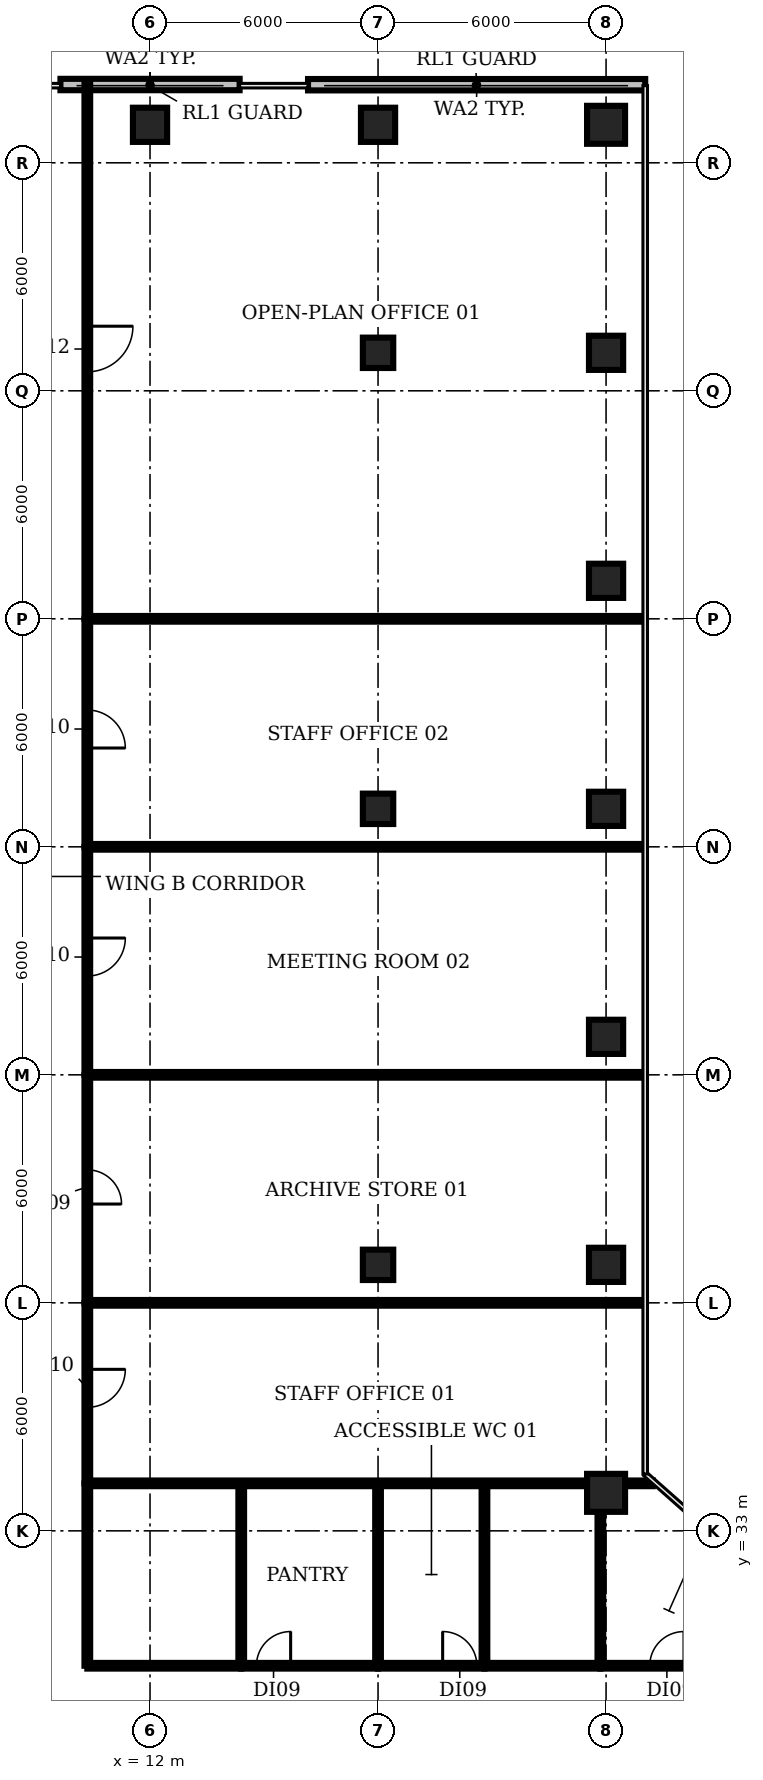
"""IFC4 building model, lengths in metres.
Left out: names, types, materials, properties, quantities, classifications, styles, units other than length and angle.
Written with IfcOpenShell. Run it as: python <this file> out.ifc"""

import sys

from ifc_helpers import new_model, si_unit, direction, frame, frame_2d, origin, origin_2d, place, context, subcontext, project, spatial, rectangle, circle, extrude, element, fill, save


model = new_model("IFC4")
c1 = context("Model", 3, precision=1e-05, world=origin(), true_north=direction((0.0, 1.0)))
c2 = subcontext(c1, "Body", "Model", "MODEL_VIEW")
j1 = project(units=[si_unit("LENGTHUNIT", "METRE"), si_unit("PLANEANGLEUNIT", "RADIAN")], contexts=[c1])
p1 = place(None, origin())
s1 = spatial("IfcSite", under=j1, at=p1, CompositionType="ELEMENT")
p2 = place(p1, origin())
s2 = spatial("IfcBuilding", under=s1, at=p2, CompositionType="ELEMENT")
p3 = place(p2, frame((0.0, 0.0, 96.2)))
s3 = spatial("IfcBuildingStorey", under=s2, at=p3, CompositionType="ELEMENT", Elevation=96.2)
p4 = place(p3, frame((12.0, 70.0, 0.0), z_axis=(0.0, 0.0, 1.0), x_axis=(1.0, 0.0, 0.0)))
e1 = element("IfcColumn", 1, at=p4, inside=s3, PredefinedType="COLUMN", context=c2, shape_type="SweptSolid", body=[
    extrude(rectangle(XDim=0.9, YDim=0.9, at=origin_2d()), origin(), (0.0, 0.0, 1.0), 3.85),
])
for number, where, z_axis, x_axis in (
    (2, (18.0, 40.0, 0.0), (0.0, 0.0, 1.0), (1.0, 0.0, 0.0)),
    (3, (18.0, 52.0, 0.0), (0.0, 0.0, 1.0), (1.0, 0.0, 0.0)),
    (4, (18.0, 64.0, 0.0), (0.0, 0.0, 1.0), (1.0, 0.0, 0.0)),
):
    element("IfcColumn", number, at=place(p3, frame(where, z_axis=z_axis, x_axis=x_axis)), inside=s3, PredefinedType="COLUMN", context=c2, shape_type="SweptSolid", body=[
        extrude(rectangle(XDim=0.8, YDim=0.8, at=origin_2d()), origin(), (0.0, 0.0, 1.0), 3.85),
    ])
p5 = place(p3, frame((18.0, 70.0, 0.0), z_axis=(0.0, 0.0, 1.0), x_axis=(1.0, 0.0, 0.0)))
e5 = element("IfcColumn", 5, at=p5, inside=s3, PredefinedType="COLUMN", context=c2, shape_type="SweptSolid", body=[
    extrude(rectangle(XDim=0.9, YDim=0.9, at=origin_2d()), origin(), (0.0, 0.0, 1.0), 3.85),
])
p6 = place(p3, frame((24.0, 34.0, 0.0), z_axis=(0.0, 0.0, 1.0), x_axis=(1.0, 0.0, 0.0)))
e6 = element("IfcColumn", 6, at=p6, inside=s3, PredefinedType="COLUMN", context=c2, shape_type="SweptSolid", body=[
    extrude(circle(Radius=0.5, at=origin_2d()), origin(), (0.0, 0.0, 1.0), 3.85),
])
for number, where, z_axis, x_axis in (
    (7, (24.0, 40.0, 0.0), (0.0, 0.0, 1.0), (1.0, 0.0, 0.0)),
    (8, (24.0, 46.0, 0.0), (0.0, 0.0, 1.0), (1.0, 0.0, 0.0)),
    (9, (24.0, 52.0, 0.0), (0.0, 0.0, 1.0), (1.0, 0.0, 0.0)),
    (10, (24.0, 58.0, 0.0), (0.0, 0.0, 1.0), (1.0, 0.0, 0.0)),
    (11, (24.0, 64.0, 0.0), (0.0, 0.0, 1.0), (1.0, 0.0, 0.0)),
):
    element("IfcColumn", number, at=place(p3, frame(where, z_axis=z_axis, x_axis=x_axis)), inside=s3, PredefinedType="COLUMN", context=c2, shape_type="SweptSolid", body=[
        extrude(rectangle(XDim=0.9, YDim=0.9, at=origin_2d()), origin(), (0.0, 0.0, 1.0), 3.85),
    ])
p7 = place(p3, frame((24.0, 70.0, 0.0), z_axis=(0.0, 0.0, 1.0), x_axis=(1.0, 0.0, 0.0)))
e12 = element("IfcColumn", 12, at=p7, inside=s3, PredefinedType="COLUMN", context=c2, shape_type="SweptSolid", body=[
    extrude(circle(Radius=0.5, at=origin_2d()), origin(), (0.0, 0.0, 1.0), 3.85),
])
p8 = place(p3, frame((25.03, 71.055, 0.0), z_axis=(0.0, 0.0, 1.0), x_axis=(-1.0, 0.0, 0.0)))
e13 = element("IfcWall", 13, at=p8, inside=s3, PredefinedType="SOLIDWALL", context=c2, shape_type="SweptSolid", body=[
    extrude(rectangle(XDim=8.873, YDim=0.3, at=frame_2d((4.436, 0.0))), origin(), (0.0, 0.0, 1.0), 3.85),
])
p9 = place(p3, frame((14.357, 71.06, 0.0), z_axis=(0.0, 0.0, 1.0), x_axis=(-1.0, 0.0, 0.0)))
e14 = element("IfcWall", 14, at=p9, inside=s3, PredefinedType="SOLIDWALL", context=c2, shape_type="SweptSolid", body=[
    extrude(rectangle(XDim=4.715, YDim=0.3, at=frame_2d((2.357, 0.0))), origin(), (0.0, 0.0, 1.0), 3.85),
])
p10 = place(p3, frame((10.35, 29.45, 0.0), z_axis=(0.0, 0.0, 1.0), x_axis=(0.0, 1.0, 0.0)))
e15 = element("IfcWall", 15, at=p10, inside=s3, PredefinedType="PARTITIONING", context=c2, shape_type="SweptSolid", body=[
    extrude(rectangle(XDim=4.8, YDim=0.15, at=frame_2d((2.4, 0.0))), origin(), (0.0, 0.0, 1.0), 2.83),
])
p11 = place(p3, frame((10.35, 29.45, 0.0), z_axis=(0.0, 0.0, 1.0), x_axis=(1.0, 0.0, 0.0)))
e16 = element("IfcWall", 16, at=p11, inside=s3, PredefinedType="PARTITIONING", context=c2, shape_type="SweptSolid", body=[
    extrude(rectangle(XDim=4.05, YDim=0.15, at=frame_2d((2.025, 0.0))), origin(), (0.0, 0.0, 1.0), 2.83),
])
p12 = place(p3, frame((10.35, 34.25, 0.0), z_axis=(0.0, 0.0, 1.0), x_axis=(1.0, 0.0, 0.0)))
e17 = element("IfcWall", 17, at=p12, inside=s3, PredefinedType="PARTITIONING", context=c2, shape_type="SweptSolid", body=[
    extrude(rectangle(XDim=14.88, YDim=0.15, at=frame_2d((7.44, 0.0))), origin(), (0.0, 0.0, 1.0), 2.83),
])
p13 = place(p3, frame((10.35, 39.0, 0.0), z_axis=(0.0, 0.0, 1.0), x_axis=(0.0, -1.0, 0.0)))
e18 = element("IfcWall", 18, at=p13, inside=s3, PredefinedType="PARTITIONING", context=c2, shape_type="SweptSolid", body=[
    extrude(rectangle(XDim=4.75, YDim=0.15, at=frame_2d((2.375, 0.0))), origin(), (0.0, 0.0, 1.0), 2.83),
])
p14 = place(p13, frame((1.75, 0.0, 0.0)))
e19 = element("IfcOpeningElement", 19, at=p14, cuts=e18, PredefinedType="OPENING", context=c2, shape_type="SweptSolid", body=[
    extrude(rectangle(XDim=1.0, YDim=2.1, at=frame_2d((0.5, 1.05))), frame((0.0, 0.085, 0.0), z_axis=(0.0, -1.0, 0.0), x_axis=(1.0, 0.0, 0.0)), (0.0, 0.0, 1.0), 0.17),
])
p15 = place(p3, frame((10.35, 39.0, 0.0), z_axis=(0.0, 0.0, 1.0), x_axis=(1.0, 0.0, 0.0)))
e20 = element("IfcWall", 20, at=p15, inside=s3, PredefinedType="PARTITIONING", context=c2, shape_type="SweptSolid", body=[
    extrude(rectangle(XDim=14.63, YDim=0.15, at=frame_2d((7.315, 0.0))), origin(), (0.0, 0.0, 1.0), 2.83),
])
p16 = place(p3, frame((10.35, 45.0, 0.0), z_axis=(0.0, 0.0, 1.0), x_axis=(0.0, -1.0, 0.0)))
e21 = element("IfcWall", 21, at=p16, inside=s3, PredefinedType="PARTITIONING", context=c2, shape_type="SweptSolid", body=[
    extrude(rectangle(XDim=6.0, YDim=0.15, at=frame_2d((3.0, 0.0))), origin(), (0.0, 0.0, 1.0), 2.83),
])
p17 = place(p16, frame((2.5, 0.0, 0.0)))
e22 = element("IfcOpeningElement", 22, at=p17, cuts=e21, PredefinedType="OPENING", context=c2, shape_type="SweptSolid", body=[
    extrude(rectangle(XDim=0.9, YDim=2.1, at=frame_2d((0.45, 1.05))), frame((0.0, 0.085, 0.0), z_axis=(0.0, -1.0, 0.0), x_axis=(1.0, 0.0, 0.0)), (0.0, 0.0, 1.0), 0.17),
])
p18 = place(p3, frame((10.35, 45.0, 0.0), z_axis=(0.0, 0.0, 1.0), x_axis=(1.0, 0.0, 0.0)))
e23 = element("IfcWall", 23, at=p18, inside=s3, PredefinedType="PARTITIONING", context=c2, shape_type="SweptSolid", body=[
    extrude(rectangle(XDim=14.63, YDim=0.15, at=frame_2d((7.315, 0.0))), origin(), (0.0, 0.0, 1.0), 2.83),
])
p19 = place(p3, frame((10.35, 51.0, 0.0), z_axis=(0.0, 0.0, 1.0), x_axis=(0.0, -1.0, 0.0)))
e24 = element("IfcWall", 24, at=p19, inside=s3, PredefinedType="PARTITIONING", context=c2, shape_type="SweptSolid", body=[
    extrude(rectangle(XDim=6.0, YDim=0.15, at=frame_2d((3.0, 0.0))), origin(), (0.0, 0.0, 1.0), 2.83),
])
p20 = place(p19, frame((2.4, 0.0, 0.0)))
e25 = element("IfcOpeningElement", 25, at=p20, cuts=e24, PredefinedType="OPENING", context=c2, shape_type="SweptSolid", body=[
    extrude(rectangle(XDim=1.0, YDim=2.1, at=frame_2d((0.5, 1.05))), frame((0.0, 0.085, 0.0), z_axis=(0.0, -1.0, 0.0), x_axis=(1.0, 0.0, 0.0)), (0.0, 0.0, 1.0), 0.17),
])
p21 = place(p3, frame((10.35, 51.0, 0.0), z_axis=(0.0, 0.0, 1.0), x_axis=(1.0, 0.0, 0.0)))
e26 = element("IfcWall", 26, at=p21, inside=s3, PredefinedType="PARTITIONING", context=c2, shape_type="SweptSolid", body=[
    extrude(rectangle(XDim=14.63, YDim=0.15, at=frame_2d((7.315, 0.0))), origin(), (0.0, 0.0, 1.0), 2.83),
])
p22 = place(p3, frame((10.35, 57.0, 0.0), z_axis=(0.0, 0.0, 1.0), x_axis=(0.0, -1.0, 0.0)))
e27 = element("IfcWall", 27, at=p22, inside=s3, PredefinedType="PARTITIONING", context=c2, shape_type="SweptSolid", body=[
    extrude(rectangle(XDim=6.0, YDim=0.15, at=frame_2d((3.0, 0.0))), origin(), (0.0, 0.0, 1.0), 2.83),
])
p23 = place(p22, frame((2.4, 0.0, 0.0)))
e28 = element("IfcOpeningElement", 28, at=p23, cuts=e27, PredefinedType="OPENING", context=c2, shape_type="SweptSolid", body=[
    extrude(rectangle(XDim=1.0, YDim=2.1, at=frame_2d((0.5, 1.05))), frame((0.0, 0.085, 0.0), z_axis=(0.0, -1.0, 0.0), x_axis=(1.0, 0.0, 0.0)), (0.0, 0.0, 1.0), 0.17),
])
p24 = place(p3, frame((10.35, 57.0, 0.0), z_axis=(0.0, 0.0, 1.0), x_axis=(1.0, 0.0, 0.0)))
e29 = element("IfcWall", 29, at=p24, inside=s3, PredefinedType="PARTITIONING", context=c2, shape_type="SweptSolid", body=[
    extrude(rectangle(XDim=14.63, YDim=0.15, at=frame_2d((7.315, 0.0))), origin(), (0.0, 0.0, 1.0), 2.83),
])
p25 = place(p3, frame((10.35, 71.09, 0.0), z_axis=(0.0, 0.0, 1.0), x_axis=(0.0, -1.0, 0.0)))
e30 = element("IfcWall", 30, at=p25, inside=s3, PredefinedType="PARTITIONING", context=c2, shape_type="SweptSolid", body=[
    extrude(rectangle(XDim=14.09, YDim=0.15, at=frame_2d((7.045, 0.0))), origin(), (0.0, 0.0, 1.0), 2.83),
])
p26 = place(p25, frame((6.39, 0.0, 0.0)))
e31 = element("IfcOpeningElement", 31, at=p26, cuts=e30, PredefinedType="OPENING", context=c2, shape_type="SweptSolid", body=[
    extrude(rectangle(XDim=1.2, YDim=2.1, at=frame_2d((0.6, 1.05))), frame((0.0, 0.085, 0.0), z_axis=(0.0, -1.0, 0.0), x_axis=(1.0, 0.0, 0.0)), (0.0, 0.0, 1.0), 0.17),
])
p27 = place(p3, frame((14.4, 29.45, 0.0), z_axis=(0.0, 0.0, 1.0), x_axis=(0.0, 1.0, 0.0)))
e32 = element("IfcWall", 32, at=p27, inside=s3, PredefinedType="PARTITIONING", context=c2, shape_type="SweptSolid", body=[
    extrude(rectangle(XDim=4.8, YDim=0.15, at=frame_2d((2.4, 0.0))), origin(), (0.0, 0.0, 1.0), 2.83),
])
p28 = place(p3, frame((14.4, 29.45, 0.0), z_axis=(0.0, 0.0, 1.0), x_axis=(1.0, 0.0, 0.0)))
e33 = element("IfcWall", 33, at=p28, inside=s3, PredefinedType="PARTITIONING", context=c2, shape_type="SweptSolid", body=[
    extrude(rectangle(XDim=3.6, YDim=0.15, at=frame_2d((1.8, 0.0))), origin(), (0.0, 0.0, 1.0), 2.83),
])
p29 = place(p28, frame((0.4, 0.0, 0.0)))
e34 = element("IfcOpeningElement", 34, at=p29, cuts=e33, PredefinedType="OPENING", context=c2, shape_type="SweptSolid", body=[
    extrude(rectangle(XDim=0.9, YDim=2.1, at=frame_2d((0.45, 1.05))), frame((0.0, 0.085, 0.0), z_axis=(0.0, -1.0, 0.0), x_axis=(1.0, 0.0, 0.0)), (0.0, 0.0, 1.0), 0.17),
])
p30 = place(p3, frame((18.0, 29.45, 0.0), z_axis=(0.0, 0.0, 1.0), x_axis=(0.0, 1.0, 0.0)))
e35 = element("IfcWall", 35, at=p30, inside=s3, PredefinedType="PARTITIONING", context=c2, shape_type="SweptSolid", body=[
    extrude(rectangle(XDim=4.8, YDim=0.15, at=frame_2d((2.4, 0.0))), origin(), (0.0, 0.0, 1.0), 2.83),
])
p31 = place(p3, frame((18.0, 29.45, 0.0), z_axis=(0.0, 0.0, 1.0), x_axis=(1.0, 0.0, 0.0)))
e36 = element("IfcWall", 36, at=p31, inside=s3, PredefinedType="PARTITIONING", context=c2, shape_type="SweptSolid", body=[
    extrude(rectangle(XDim=2.8, YDim=0.15, at=frame_2d((1.4, 0.0))), origin(), (0.0, 0.0, 1.0), 2.83),
])
p32 = place(p31, frame((1.7, 0.0, 0.0)))
e37 = element("IfcOpeningElement", 37, at=p32, cuts=e36, PredefinedType="OPENING", context=c2, shape_type="SweptSolid", body=[
    extrude(rectangle(XDim=0.9, YDim=2.1, at=frame_2d((0.45, 1.05))), frame((0.0, 0.085, 0.0), z_axis=(0.0, -1.0, 0.0), x_axis=(1.0, 0.0, 0.0)), (0.0, 0.0, 1.0), 0.17),
])
p33 = place(p3, frame((20.8, 29.45, 0.0), z_axis=(0.0, 0.0, 1.0), x_axis=(0.0, 1.0, 0.0)))
e38 = element("IfcWall", 38, at=p33, inside=s3, PredefinedType="PARTITIONING", context=c2, shape_type="SweptSolid", body=[
    extrude(rectangle(XDim=4.8, YDim=0.15, at=frame_2d((2.4, 0.0))), origin(), (0.0, 0.0, 1.0), 2.83),
])
p34 = place(p3, frame((20.8, 29.45, 0.0), z_axis=(0.0, 0.0, 1.0), x_axis=(1.0, 0.0, 0.0)))
e39 = element("IfcWall", 39, at=p34, inside=s3, PredefinedType="PARTITIONING", context=c2, shape_type="SweptSolid", body=[
    extrude(rectangle(XDim=3.05, YDim=0.15, at=frame_2d((1.525, 0.0))), origin(), (0.0, 0.0, 1.0), 2.83),
])
p35 = place(p3, frame((23.85, 29.45, 0.0), z_axis=(0.0, 0.0, 1.0), x_axis=(0.0, 1.0, 0.0)))
e40 = element("IfcWall", 40, at=p35, inside=s3, PredefinedType="PARTITIONING", context=c2, shape_type="SweptSolid", body=[
    extrude(rectangle(XDim=4.8, YDim=0.15, at=frame_2d((2.4, 0.0))), origin(), (0.0, 0.0, 1.0), 2.83),
])
p36 = place(p3, frame((23.85, 29.45, 0.0), z_axis=(0.0, 0.0, 1.0), x_axis=(1.0, 0.0, 0.0)))
e41 = element("IfcWall", 41, at=p36, inside=s3, PredefinedType="PARTITIONING", context=c2, shape_type="SweptSolid", body=[
    extrude(rectangle(XDim=3.6, YDim=0.15, at=frame_2d((1.8, 0.0))), origin(), (0.0, 0.0, 1.0), 2.83),
])
p37 = place(p36, frame((1.3, 0.0, 0.0)))
e42 = element("IfcOpeningElement", 42, at=p37, cuts=e41, PredefinedType="OPENING", context=c2, shape_type="SweptSolid", body=[
    extrude(rectangle(XDim=0.9, YDim=2.1, at=frame_2d((0.45, 1.05))), frame((0.0, 0.085, 0.0), z_axis=(0.0, -1.0, 0.0), x_axis=(1.0, 0.0, 0.0)), (0.0, 0.0, 1.0), 0.17),
])
p38 = place(p14, origin())
e43 = element("IfcDoor", 43, at=p38, inside=s3, OperationType="SINGLE_SWING_LEFT", PredefinedType="DOOR", context=c2, shape_type="SweptSolid", body=[
    extrude(rectangle(XDim=1.0, YDim=2.1, at=frame_2d((0.5, 1.05))), frame((0.0, 0.025, 0.0), z_axis=(0.0, -1.0, 0.0), x_axis=(1.0, 0.0, 0.0)), (0.0, 0.0, 1.0), 0.05),
])
fill(e19, e43)
p39 = place(p17, origin())
e44 = element("IfcDoor", 44, at=p39, inside=s3, OperationType="SINGLE_SWING_RIGHT", PredefinedType="DOOR", context=c2, shape_type="SweptSolid", body=[
    extrude(rectangle(XDim=0.9, YDim=2.1, at=frame_2d((0.45, 1.05))), frame((0.0, 0.025, 0.0), z_axis=(0.0, -1.0, 0.0), x_axis=(1.0, 0.0, 0.0)), (0.0, 0.0, 1.0), 0.05),
])
fill(e22, e44)
p40 = place(p20, origin())
e45 = element("IfcDoor", 45, at=p40, inside=s3, OperationType="SINGLE_SWING_LEFT", PredefinedType="DOOR", context=c2, shape_type="SweptSolid", body=[
    extrude(rectangle(XDim=1.0, YDim=2.1, at=frame_2d((0.5, 1.05))), frame((0.0, 0.025, 0.0), z_axis=(0.0, -1.0, 0.0), x_axis=(1.0, 0.0, 0.0)), (0.0, 0.0, 1.0), 0.05),
])
fill(e25, e45)
p41 = place(p23, origin())
e46 = element("IfcDoor", 46, at=p41, inside=s3, OperationType="SINGLE_SWING_RIGHT", PredefinedType="DOOR", context=c2, shape_type="SweptSolid", body=[
    extrude(rectangle(XDim=1.0, YDim=2.1, at=frame_2d((0.5, 1.05))), frame((0.0, 0.025, 0.0), z_axis=(0.0, -1.0, 0.0), x_axis=(1.0, 0.0, 0.0)), (0.0, 0.0, 1.0), 0.05),
])
fill(e28, e46)
p42 = place(p26, origin())
e47 = element("IfcDoor", 47, at=p42, inside=s3, OperationType="SINGLE_SWING_LEFT", PredefinedType="DOOR", context=c2, shape_type="SweptSolid", body=[
    extrude(rectangle(XDim=1.2, YDim=2.1, at=frame_2d((0.6, 1.05))), frame((0.0, 0.025, 0.0), z_axis=(0.0, -1.0, 0.0), x_axis=(1.0, 0.0, 0.0)), (0.0, 0.0, 1.0), 0.05),
])
fill(e31, e47)
p43 = place(p29, origin())
e48 = element("IfcDoor", 48, at=p43, inside=s3, OperationType="SINGLE_SWING_RIGHT", PredefinedType="DOOR", context=c2, shape_type="SweptSolid", body=[
    extrude(rectangle(XDim=0.9, YDim=2.1, at=frame_2d((0.45, 1.05))), frame((0.0, 0.025, 0.0), z_axis=(0.0, -1.0, 0.0), x_axis=(1.0, 0.0, 0.0)), (0.0, 0.0, 1.0), 0.05),
])
fill(e34, e48)
p44 = place(p32, origin())
e49 = element("IfcDoor", 49, at=p44, inside=s3, OperationType="SINGLE_SWING_LEFT", PredefinedType="DOOR", context=c2, shape_type="SweptSolid", body=[
    extrude(rectangle(XDim=0.9, YDim=2.1, at=frame_2d((0.45, 1.05))), frame((0.0, 0.025, 0.0), z_axis=(0.0, -1.0, 0.0), x_axis=(1.0, 0.0, 0.0)), (0.0, 0.0, 1.0), 0.05),
])
fill(e37, e49)
p45 = place(p37, origin())
e50 = element("IfcDoor", 50, at=p45, inside=s3, OperationType="SINGLE_SWING_RIGHT", PredefinedType="DOOR", context=c2, shape_type="SweptSolid", body=[
    extrude(rectangle(XDim=0.9, YDim=2.1, at=frame_2d((0.45, 1.05))), frame((0.0, 0.025, 0.0), z_axis=(0.0, -1.0, 0.0), x_axis=(1.0, 0.0, 0.0)), (0.0, 0.0, 1.0), 0.05),
])
fill(e42, e50)
save(model, sys.argv[1])
